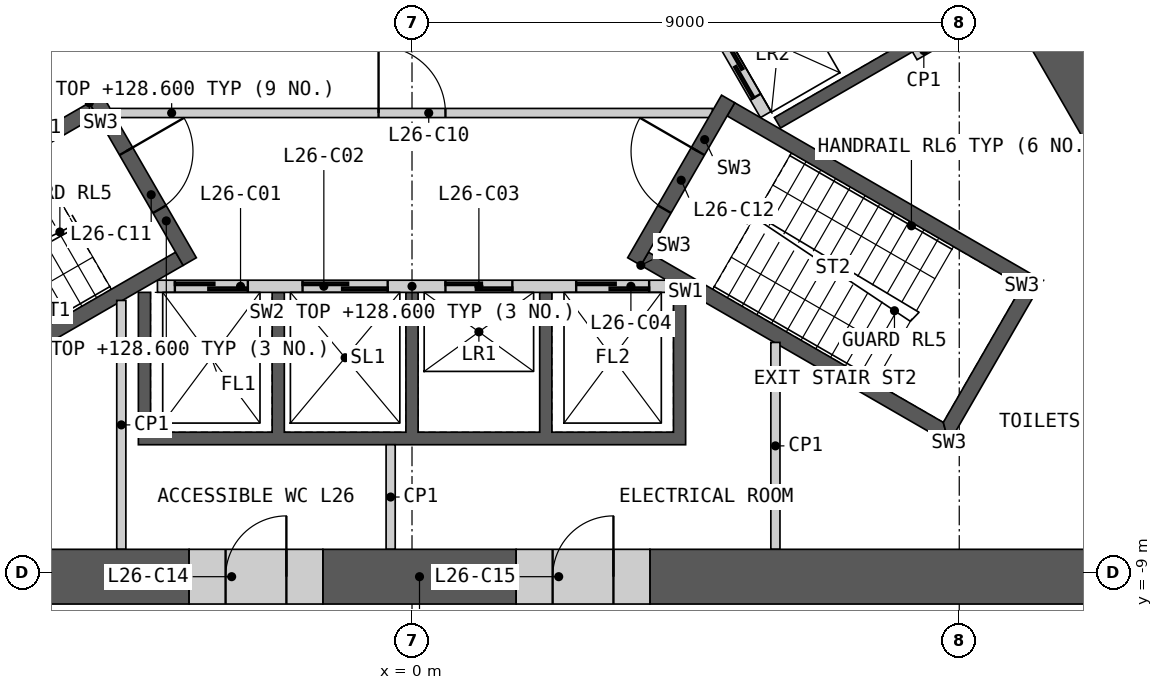
"""IFC4 building model, lengths in metres.
Left out: names, types, materials, properties, quantities, classifications, styles, units other than length and angle.
Written with IfcOpenShell. Run it as: python <this file> out.ifc"""

import sys

from ifc_helpers import new_model, si_unit, direction, frame, frame_2d, origin, place, context, subcontext, project, spatial, polyline, rectangle, outline, extrude, element, fill, save


model = new_model("IFC4")
c1 = context("Model", 3, precision=1e-05, world=origin(), true_north=direction((0.0, 1.0)))
c2 = subcontext(c1, "Body", "Model", "MODEL_VIEW")
j1 = project(units=[si_unit("LENGTHUNIT", "METRE"), si_unit("PLANEANGLEUNIT", "RADIAN")], contexts=[c1])
p1 = place(None, origin())
s1 = spatial("IfcSite", under=j1, at=p1, CompositionType="ELEMENT")
p2 = place(p1, origin())
s2 = spatial("IfcBuilding", under=s1, at=p2, CompositionType="ELEMENT")
p3 = place(p2, frame((0.0, 0.0, 124.8)))
s3 = spatial("IfcBuildingStorey", under=s2, at=p3, CompositionType="ELEMENT", Elevation=124.8)
p4 = place(p3, origin())
e1 = element("IfcWall", 1, at=p4, inside=s3, PredefinedType="SHEAR", context=c2, shape_type="SweptSolid", body=[
    extrude(outline(polyline([(4.5, -4.4), (4.5, -6.906), (-4.5, -6.906), (-4.5, -4.4), (-4.3, -4.4), (-4.3, -6.7), (-2.3, -6.7), (-2.3, -4.4), (-2.1, -4.4), (-2.1, -6.7), (-0.1, -6.7), (-0.1, -4.4), (0.1, -4.4), (0.1, -6.7), (2.1, -6.7), (2.1, -4.4), (2.3, -4.4), (2.3, -6.7), (4.3, -6.7), (4.3, -4.4), (4.5, -4.4)])), origin(), (0.0, 0.0, 1.0), 3.8),
])
p5 = place(p3, frame((-4.187, -4.3, 0.0), z_axis=(0.0, 0.0, 1.0), x_axis=(1.0, 0.0, 0.0)))
e2 = element("IfcWall", 2, at=p5, inside=s3, PredefinedType="SOLIDWALL", context=c2, shape_type="SweptSolid", body=[
    extrude(rectangle(XDim=8.373, YDim=0.2, at=frame_2d((4.187, 0.0))), origin(), (0.0, 0.0, 1.0), 3.8),
])
p6 = place(p5, frame((0.287, 0.0, 0.0)))
e3 = element("IfcOpeningElement", 3, at=p6, cuts=e2, PredefinedType="OPENING", context=c2, shape_type="SweptSolid", body=[
    extrude(rectangle(XDim=1.2, YDim=2.1, at=frame_2d((0.6, 1.05))), frame((0.0, 0.11, 0.0), z_axis=(0.0, -1.0, 0.0), x_axis=(1.0, 0.0, 0.0)), (0.0, 0.0, 1.0), 0.22),
])
p7 = place(p5, frame((2.387, 0.0, 0.0)))
e4 = element("IfcOpeningElement", 4, at=p7, cuts=e2, PredefinedType="OPENING", context=c2, shape_type="SweptSolid", body=[
    extrude(rectangle(XDim=1.4, YDim=2.1, at=frame_2d((0.7, 1.05))), frame((0.0, 0.11, 0.0), z_axis=(0.0, -1.0, 0.0), x_axis=(1.0, 0.0, 0.0)), (0.0, 0.0, 1.0), 0.22),
])
p8 = place(p5, frame((4.737, 0.0, 0.0)))
e5 = element("IfcOpeningElement", 5, at=p8, cuts=e2, PredefinedType="OPENING", context=c2, shape_type="SweptSolid", body=[
    extrude(rectangle(XDim=1.1, YDim=2.1, at=frame_2d((0.55, 1.05))), frame((0.0, 0.11, 0.0), z_axis=(0.0, -1.0, 0.0), x_axis=(1.0, 0.0, 0.0)), (0.0, 0.0, 1.0), 0.22),
])
p9 = place(p5, frame((6.887, 0.0, 0.0)))
e6 = element("IfcOpeningElement", 6, at=p9, cuts=e2, PredefinedType="OPENING", context=c2, shape_type="SweptSolid", body=[
    extrude(rectangle(XDim=1.2, YDim=2.1, at=frame_2d((0.6, 1.05))), frame((0.0, 0.11, 0.0), z_axis=(0.0, -1.0, 0.0), x_axis=(1.0, 0.0, 0.0)), (0.0, 0.0, 1.0), 0.22),
])
p10 = place(p3, origin())
e7 = element("IfcWall", 7, at=p10, inside=s3, PredefinedType="SHEAR", context=c2, shape_type="SweptSolid", body=[
    extrude(outline(polyline([(2.66, 4.192), (4.831, 5.445), (8.231, -0.444), (6.061, -1.697), (5.96, -1.524), (7.952, -0.374), (6.952, 1.358), (4.96, 0.208), (4.861, 0.381), (6.852, 1.531), (5.852, 3.263), (3.861, 2.113), (3.76, 2.287), (5.752, 3.437), (4.752, 5.169), (2.76, 4.019), (2.66, 4.192)])), origin(), (0.0, 0.0, 1.0), 3.8),
])
p11 = place(p3, frame((5.817, -1.476, 0.0), z_axis=(0.0, 0.0, 1.0), x_axis=(-0.500002616675, 0.866023893041, 0.0)))
e8 = element("IfcWall", 8, at=p11, inside=s3, PredefinedType="SOLIDWALL", context=c2, shape_type="SweptSolid", body=[
    extrude(rectangle(XDim=8.373, YDim=0.2, at=frame_2d((4.187, 0.0))), origin(), (0.0, 0.0, 1.0), 3.8),
])
p12 = place(p11, frame((0.337, 0.0, 0.0)))
e9 = element("IfcOpeningElement", 9, at=p12, cuts=e8, PredefinedType="OPENING", context=c2, shape_type="SweptSolid", body=[
    extrude(rectangle(XDim=1.1, YDim=2.1, at=frame_2d((0.55, 1.05))), frame((0.0, 0.11, 0.0), z_axis=(0.0, -1.0, 0.0), x_axis=(1.0, 0.0, 0.0)), (0.0, 0.0, 1.0), 0.22),
])
p13 = place(p11, frame((2.537, 0.0, 0.0)))
e10 = element("IfcOpeningElement", 10, at=p13, cuts=e8, PredefinedType="OPENING", context=c2, shape_type="SweptSolid", body=[
    extrude(rectangle(XDim=1.1, YDim=2.1, at=frame_2d((0.55, 1.05))), frame((0.0, 0.11, 0.0), z_axis=(0.0, -1.0, 0.0), x_axis=(1.0, 0.0, 0.0)), (0.0, 0.0, 1.0), 0.22),
])
p14 = place(p11, frame((4.737, 0.0, 0.0)))
e11 = element("IfcOpeningElement", 11, at=p14, cuts=e8, PredefinedType="OPENING", context=c2, shape_type="SweptSolid", body=[
    extrude(rectangle(XDim=1.1, YDim=2.1, at=frame_2d((0.55, 1.05))), frame((0.0, 0.11, 0.0), z_axis=(0.0, -1.0, 0.0), x_axis=(1.0, 0.0, 0.0)), (0.0, 0.0, 1.0), 0.22),
])
p15 = place(p11, frame((7.037, 0.0, 0.0)))
e12 = element("IfcOpeningElement", 12, at=p15, cuts=e8, PredefinedType="OPENING", context=c2, shape_type="SweptSolid", body=[
    extrude(rectangle(XDim=0.9, YDim=2.1, at=frame_2d((0.45, 1.05))), frame((0.0, 0.11, 0.0), z_axis=(0.0, -1.0, 0.0), x_axis=(1.0, 0.0, 0.0)), (0.0, 0.0, 1.0), 0.22),
])
p16 = place(p3, frame((-4.941, -1.45, 0.0), z_axis=(0.0, 0.0, 1.0), x_axis=(1.0, 0.0, 0.0)))
e13 = element("IfcWall", 13, at=p16, inside=s3, PredefinedType="PARTITIONING", context=c2, shape_type="SweptSolid", body=[
    extrude(rectangle(XDim=9.882, YDim=0.15, at=frame_2d((4.941, 0.0))), origin(), (0.0, 0.0, 1.0), 3.8),
])
p17 = place(p16, frame((4.391, 0.0, 0.0)))
e14 = element("IfcOpeningElement", 14, at=p17, cuts=e13, PredefinedType="OPENING", context=c2, shape_type="SweptSolid", body=[
    extrude(rectangle(XDim=1.1, YDim=2.1, at=frame_2d((0.55, 1.05))), frame((0.0, 0.085, 0.0), z_axis=(0.0, -1.0, 0.0), x_axis=(1.0, 0.0, 0.0)), (0.0, 0.0, 1.0), 0.17),
])
p18 = place(p3, origin())
e15 = element("IfcWall", 15, at=p18, inside=s3, PredefinedType="SHEAR", context=c2, shape_type="SweptSolid", body=[
    extrude(outline(polyline([(-5.307, -1.281), (-10.374, -4.206), (-10.032, -4.298), (-5.182, -1.498), (-5.307, -1.281)])), origin(), (0.0, 0.0, 1.0), 3.8),
])
p19 = place(p3, origin())
e16 = element("IfcWall", 16, at=p19, inside=s3, PredefinedType="SHEAR", context=c2, shape_type="SweptSolid", body=[
    extrude(outline(polyline([(-8.738, -6.539), (-8.83, -6.881), (-3.763, -3.956), (-3.888, -3.739), (-8.738, -6.539)])), origin(), (0.0, 0.0, 1.0), 3.8),
])
p20 = place(p3, frame((-5.199, -1.219, 0.0), z_axis=(0.0, 0.0, 1.0), x_axis=(0.499982516597, -0.866035497597, 0.0)))
e17 = element("IfcWall", 17, at=p20, inside=s3, PredefinedType="SHEAR", context=c2, shape_type="SweptSolid", body=[
    extrude(rectangle(XDim=3.088, YDim=0.25, at=frame_2d((1.544, 0.0))), origin(), (0.0, 0.0, 1.0), 3.8),
])
p21 = place(p20, frame((0.994, 0.0, 0.0)))
e18 = element("IfcOpeningElement", 18, at=p21, cuts=e17, PredefinedType="OPENING", context=c2, shape_type="SweptSolid", body=[
    extrude(rectangle(XDim=1.1, YDim=2.1, at=frame_2d((0.55, 1.05))), frame((0.0, 0.135, 0.0), z_axis=(0.0, -1.0, 0.0), x_axis=(1.0, 0.0, 0.0)), (0.0, 0.0, 1.0), 0.27),
])
p22 = place(p3, origin())
e19 = element("IfcWall", 19, at=p22, inside=s3, PredefinedType="SHEAR", context=c2, shape_type="SweptSolid", body=[
    extrude(outline(polyline([(3.763, -3.956), (8.83, -6.881), (8.738, -6.539), (3.888, -3.739), (3.763, -3.956)])), origin(), (0.0, 0.0, 1.0), 3.8),
])
p23 = place(p3, origin())
e20 = element("IfcWall", 20, at=p23, inside=s3, PredefinedType="SHEAR", context=c2, shape_type="SweptSolid", body=[
    extrude(outline(polyline([(8.83, -6.881), (10.374, -4.206), (10.032, -4.298), (8.738, -6.539), (8.83, -6.881)])), origin(), (0.0, 0.0, 1.0), 3.8),
])
p24 = place(p3, origin())
e21 = element("IfcWall", 21, at=p24, inside=s3, PredefinedType="SHEAR", context=c2, shape_type="SweptSolid", body=[
    extrude(outline(polyline([(10.032, -4.298), (10.374, -4.206), (5.307, -1.281), (5.182, -1.498), (10.032, -4.298)])), origin(), (0.0, 0.0, 1.0), 3.8),
])
p25 = place(p3, frame((3.655, -3.893, 0.0), z_axis=(0.0, 0.0, 1.0), x_axis=(0.499982516597, 0.866035497597, 0.0)))
e22 = element("IfcWall", 22, at=p25, inside=s3, PredefinedType="SHEAR", context=c2, shape_type="SweptSolid", body=[
    extrude(rectangle(XDim=3.088, YDim=0.25, at=frame_2d((1.544, 0.0))), origin(), (0.0, 0.0, 1.0), 3.8),
])
p26 = place(p25, frame((0.994, 0.0, 0.0)))
e23 = element("IfcOpeningElement", 23, at=p26, cuts=e22, PredefinedType="OPENING", context=c2, shape_type="SweptSolid", body=[
    extrude(rectangle(XDim=1.1, YDim=2.1, at=frame_2d((0.55, 1.05))), frame((0.0, 0.135, 0.0), z_axis=(0.0, -1.0, 0.0), x_axis=(1.0, 0.0, 0.0)), (0.0, 0.0, 1.0), 0.27),
])
p27 = place(p3, frame((8.268, -0.509, 0.0), z_axis=(0.0, 0.0, 1.0), x_axis=(0.866024871741, 0.500000921525, 0.0)))
e24 = element("IfcWall", 24, at=p27, inside=s3, PredefinedType="PARTITIONING", context=c2, shape_type="SweptSolid", body=[
    extrude(rectangle(XDim=1.72, YDim=0.15, at=frame_2d((0.86, 0.0))), origin(), (0.0, 0.0, 1.0), 3.8),
])
p28 = place(p3, frame((5.977, -8.626, 0.0), z_axis=(0.0, 0.0, 1.0), x_axis=(0.0, 1.0, 0.0)))
e25 = element("IfcWall", 25, at=p28, inside=s3, PredefinedType="PARTITIONING", context=c2, shape_type="SweptSolid", body=[
    extrude(rectangle(XDim=3.403, YDim=0.15, at=frame_2d((1.701, 0.0))), origin(), (0.0, 0.0, 1.0), 3.8),
])
p29 = place(p3, frame((-0.351, -8.626, 0.0), z_axis=(0.0, 0.0, 1.0), x_axis=(0.0, 1.0, 0.0)))
e26 = element("IfcWall", 26, at=p29, inside=s3, PredefinedType="PARTITIONING", context=c2, shape_type="SweptSolid", body=[
    extrude(rectangle(XDim=1.72, YDim=0.15, at=frame_2d((0.86, 0.0))), origin(), (0.0, 0.0, 1.0), 3.8),
])
p30 = place(p3, frame((-4.781, -8.626, 0.0), z_axis=(0.0, 0.0, 1.0), x_axis=(0.0, 1.0, 0.0)))
e27 = element("IfcWall", 27, at=p30, inside=s3, PredefinedType="PARTITIONING", context=c2, shape_type="SweptSolid", body=[
    extrude(rectangle(XDim=4.093, YDim=0.15, at=frame_2d((2.047, 0.0))), origin(), (0.0, 0.0, 1.0), 3.8),
])
p31 = place(p3, frame((-14.941, -9.076, 0.0), z_axis=(0.0, 0.0, 1.0), x_axis=(1.0, 0.0, 0.0)))
e28 = element("IfcWall", 28, at=p31, inside=s3, PredefinedType="SHEAR", context=c2, shape_type="SweptSolid", body=[
    extrude(rectangle(XDim=11.275, YDim=0.9, at=frame_2d((5.638, 0.0))), origin(), (0.0, 0.0, 1.0), 3.8),
])
p32 = place(p3, frame((3.913, -9.076, 0.0), z_axis=(0.0, 0.0, 1.0), x_axis=(1.0, 0.0, 0.0)))
e29 = element("IfcWall", 29, at=p32, inside=s3, PredefinedType="SHEAR", context=c2, shape_type="SweptSolid", body=[
    extrude(rectangle(XDim=11.029, YDim=0.9, at=frame_2d((5.514, 0.0))), origin(), (0.0, 0.0, 1.0), 3.8),
])
p33 = place(p3, frame((-1.466, -9.076, 0.0), z_axis=(0.0, 0.0, 1.0), x_axis=(1.0, 0.0, 0.0)))
e30 = element("IfcWall", 30, at=p33, inside=s3, PredefinedType="SHEAR", context=c2, shape_type="SweptSolid", body=[
    extrude(rectangle(XDim=3.179, YDim=0.9, at=frame_2d((1.589, 0.0))), origin(), (0.0, 0.0, 1.0), 3.8),
])
p34 = place(p3, frame((12.208, -2.992, 0.0), z_axis=(0.0, 0.0, 1.0), x_axis=(-0.499990106751, 0.866031115579, 0.0)))
e31 = element("IfcWall", 31, at=p34, inside=s3, PredefinedType="SHEAR", context=c2, shape_type="SweptSolid", body=[
    extrude(rectangle(XDim=6.396, YDim=0.9, at=frame_2d((3.198, 0.0))), origin(), (0.0, 0.0, 1.0), 3.8),
])
p35 = place(p3, frame((-3.666, -9.076, 0.0), z_axis=(0.0, 0.0, 1.0), x_axis=(1.0, 0.0, 0.0)))
e32 = element("IfcWall", 32, at=p35, inside=s3, PredefinedType="SHEAR", context=c2, shape_type="SweptSolid", body=[
    extrude(rectangle(XDim=2.2, YDim=0.9, at=frame_2d((1.1, 0.0))), origin(), (0.0, 0.0, 1.0), 3.8),
])
p36 = place(p35, frame((0.6, 0.0, 0.0)))
e33 = element("IfcOpeningElement", 33, at=p36, cuts=e32, PredefinedType="OPENING", context=c2, shape_type="SweptSolid", body=[
    extrude(rectangle(XDim=1.0, YDim=2.1, at=frame_2d((0.5, 1.05))), frame((0.0, 0.46, 0.0), z_axis=(0.0, -1.0, 0.0), x_axis=(1.0, 0.0, 0.0)), (0.0, 0.0, 1.0), 0.92),
])
p37 = place(p3, frame((1.713, -9.076, 0.0), z_axis=(0.0, 0.0, 1.0), x_axis=(1.0, 0.0, 0.0)))
e34 = element("IfcWall", 34, at=p37, inside=s3, PredefinedType="SHEAR", context=c2, shape_type="SweptSolid", body=[
    extrude(rectangle(XDim=2.2, YDim=0.9, at=frame_2d((1.1, 0.0))), origin(), (0.0, 0.0, 1.0), 3.8),
])
p38 = place(p37, frame((0.6, 0.0, 0.0)))
e35 = element("IfcOpeningElement", 35, at=p38, cuts=e34, PredefinedType="OPENING", context=c2, shape_type="SweptSolid", body=[
    extrude(rectangle(XDim=1.0, YDim=2.1, at=frame_2d((0.5, 1.05))), frame((0.0, 0.46, 0.0), z_axis=(0.0, -1.0, 0.0), x_axis=(1.0, 0.0, 0.0)), (0.0, 0.0, 1.0), 0.92),
])
p39 = place(p3, frame((10.46, 5.736, 0.0), z_axis=(0.0, 0.0, 1.0), x_axis=(0.500004141693, -0.866023012564, 0.0)))
e36 = element("IfcWall", 36, at=p39, inside=s3, PredefinedType="PARTITIONING", context=c2, shape_type="SweptSolid", body=[
    extrude(rectangle(XDim=9.803, YDim=0.2, at=frame_2d((4.902, 0.0))), origin(), (0.0, 0.0, 1.0), 3.8),
])
p40 = place(p39, frame((4.352, 0.0, 0.0)))
e37 = element("IfcOpeningElement", 37, at=p40, cuts=e36, PredefinedType="OPENING", context=c2, shape_type="SweptSolid", body=[
    extrude(rectangle(XDim=1.0, YDim=2.1, at=frame_2d((0.5, 1.05))), frame((0.0, 0.11, 0.0), z_axis=(0.0, -1.0, 0.0), x_axis=(1.0, 0.0, 0.0)), (0.0, 0.0, 1.0), 0.22),
])
p41 = place(p6, origin())
e38 = element("IfcDoor", 38, at=p41, inside=s3, OperationType="SLIDING_TO_LEFT", PredefinedType="DOOR", context=c2, shape_type="SweptSolid", body=[
    extrude(rectangle(XDim=1.2, YDim=2.1, at=frame_2d((0.6, 1.05))), frame((0.0, 0.025, 0.0), z_axis=(0.0, -1.0, 0.0), x_axis=(1.0, 0.0, 0.0)), (0.0, 0.0, 1.0), 0.05),
])
fill(e3, e38)
p42 = place(p7, origin())
e39 = element("IfcDoor", 39, at=p42, inside=s3, OperationType="SLIDING_TO_LEFT", PredefinedType="DOOR", context=c2, shape_type="SweptSolid", body=[
    extrude(rectangle(XDim=1.4, YDim=2.1, at=frame_2d((0.7, 1.05))), frame((0.0, 0.025, 0.0), z_axis=(0.0, -1.0, 0.0), x_axis=(1.0, 0.0, 0.0)), (0.0, 0.0, 1.0), 0.05),
])
fill(e4, e39)
p43 = place(p8, origin())
e40 = element("IfcDoor", 40, at=p43, inside=s3, OperationType="SLIDING_TO_LEFT", PredefinedType="DOOR", context=c2, shape_type="SweptSolid", body=[
    extrude(rectangle(XDim=1.1, YDim=2.1, at=frame_2d((0.55, 1.05))), frame((0.0, 0.025, 0.0), z_axis=(0.0, -1.0, 0.0), x_axis=(1.0, 0.0, 0.0)), (0.0, 0.0, 1.0), 0.05),
])
fill(e5, e40)
p44 = place(p9, origin())
e41 = element("IfcDoor", 41, at=p44, inside=s3, OperationType="SLIDING_TO_LEFT", PredefinedType="DOOR", context=c2, shape_type="SweptSolid", body=[
    extrude(rectangle(XDim=1.2, YDim=2.1, at=frame_2d((0.6, 1.05))), frame((0.0, 0.025, 0.0), z_axis=(0.0, -1.0, 0.0), x_axis=(1.0, 0.0, 0.0)), (0.0, 0.0, 1.0), 0.05),
])
fill(e6, e41)
p45 = place(p12, origin())
e42 = element("IfcDoor", 42, at=p45, inside=s3, OperationType="SLIDING_TO_LEFT", PredefinedType="DOOR", context=c2, shape_type="SweptSolid", body=[
    extrude(rectangle(XDim=1.1, YDim=2.1, at=frame_2d((0.55, 1.05))), frame((0.0, 0.025, 0.0), z_axis=(0.0, -1.0, 0.0), x_axis=(1.0, 0.0, 0.0)), (0.0, 0.0, 1.0), 0.05),
])
fill(e9, e42)
p46 = place(p17, origin())
e43 = element("IfcDoor", 43, at=p46, inside=s3, OperationType="SINGLE_SWING_LEFT", PredefinedType="DOOR", context=c2, shape_type="SweptSolid", body=[
    extrude(rectangle(XDim=1.1, YDim=2.1, at=frame_2d((0.55, 1.05))), frame((0.0, 0.025, 0.0), z_axis=(0.0, -1.0, 0.0), x_axis=(1.0, 0.0, 0.0)), (0.0, 0.0, 1.0), 0.05),
])
fill(e14, e43)
p47 = place(p21, origin())
e44 = element("IfcDoor", 44, at=p47, inside=s3, OperationType="SINGLE_SWING_LEFT", PredefinedType="DOOR", context=c2, shape_type="SweptSolid", body=[
    extrude(rectangle(XDim=1.1, YDim=2.1, at=frame_2d((0.55, 1.05))), frame((0.0, 0.025, 0.0), z_axis=(0.0, -1.0, 0.0), x_axis=(1.0, 0.0, 0.0)), (0.0, 0.0, 1.0), 0.05),
])
fill(e18, e44)
p48 = place(p26, origin())
e45 = element("IfcDoor", 45, at=p48, inside=s3, OperationType="SINGLE_SWING_RIGHT", PredefinedType="DOOR", context=c2, shape_type="SweptSolid", body=[
    extrude(rectangle(XDim=1.1, YDim=2.1, at=frame_2d((0.55, 1.05))), frame((0.0, 0.025, 0.0), z_axis=(0.0, -1.0, 0.0), x_axis=(1.0, 0.0, 0.0)), (0.0, 0.0, 1.0), 0.05),
])
fill(e23, e45)
p49 = place(p36, origin())
e46 = element("IfcDoor", 46, at=p49, inside=s3, OperationType="SINGLE_SWING_RIGHT", PredefinedType="DOOR", context=c2, shape_type="SweptSolid", body=[
    extrude(rectangle(XDim=1.0, YDim=2.1, at=frame_2d((0.5, 1.05))), frame((0.0, 0.205, 0.0), z_axis=(0.0, -1.0, 0.0), x_axis=(1.0, 0.0, 0.0)), (0.0, 0.0, 1.0), 0.05),
])
fill(e33, e46)
p50 = place(p38, origin())
e47 = element("IfcDoor", 47, at=p50, inside=s3, OperationType="SINGLE_SWING_RIGHT", PredefinedType="DOOR", context=c2, shape_type="SweptSolid", body=[
    extrude(rectangle(XDim=1.0, YDim=2.1, at=frame_2d((0.5, 1.05))), frame((0.0, 0.205, 0.0), z_axis=(0.0, -1.0, 0.0), x_axis=(1.0, 0.0, 0.0)), (0.0, 0.0, 1.0), 0.05),
])
fill(e35, e47)
save(model, sys.argv[1])
